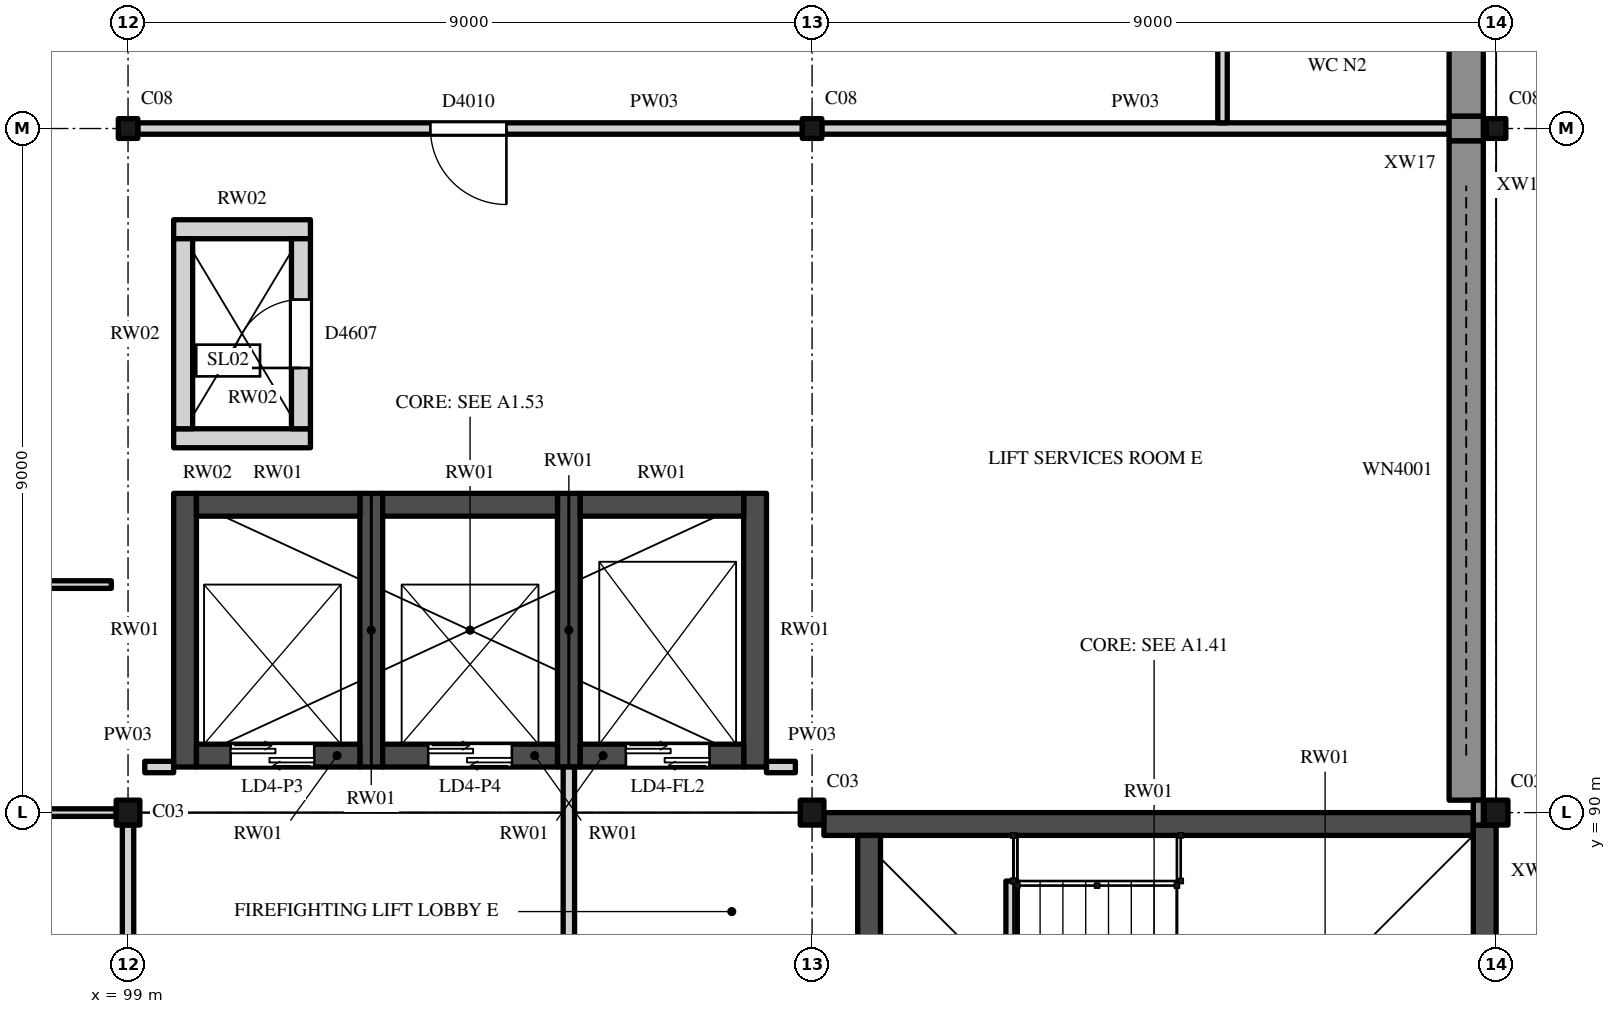
"""IFC4 building model, lengths in metres.
Left out: names, types, materials, properties, quantities, classifications, styles, units other than length and angle.
Written with IfcOpenShell. Run it as: python <this file> out.ifc"""

import sys

from ifc_helpers import new_model, si_unit, direction, frame, frame_2d, origin, origin_2d, place, context, subcontext, project, spatial, rectangle, i_section, extrude, element, fill, save


model = new_model("IFC4")
c1 = context("Model", 3, precision=1e-05, world=origin(), true_north=direction((0.0, 1.0)))
c2 = subcontext(c1, "Body", "Model", "MODEL_VIEW")
j1 = project(units=[si_unit("LENGTHUNIT", "METRE"), si_unit("PLANEANGLEUNIT", "RADIAN")], contexts=[c1])
p1 = place(None, origin())
s1 = spatial("IfcSite", under=j1, at=p1, CompositionType="ELEMENT")
p2 = place(p1, origin())
s2 = spatial("IfcBuilding", under=s1, at=p2, CompositionType="ELEMENT")
p3 = place(p2, frame((0.0, 0.0, 26.0)))
s3 = spatial("IfcBuildingStorey", under=s2, at=p3, CompositionType="ELEMENT", Elevation=26.0)
for number, where, z_axis, x_axis in (
    (1, (99.0, 90.0, 0.0), (0.0, 0.0, 1.0), (1.0, 0.0, 0.0)),
    (2, (108.0, 90.0, 0.0), (0.0, 0.0, 1.0), (1.0, 0.0, 0.0)),
    (3, (117.0, 90.0, 0.0), (0.0, 0.0, 1.0), (1.0, 0.0, 0.0)),
):
    element("IfcColumn", number, at=place(p3, frame(where, z_axis=z_axis, x_axis=x_axis)), inside=s3, PredefinedType="COLUMN", context=c2, shape_type="SweptSolid", body=[
        extrude(i_section(OverallWidth=0.311, OverallDepth=0.327, WebThickness=0.016, FlangeThickness=0.025, FilletRadius=0.017, at=origin_2d()), origin(), (0.0, 0.0, 1.0), 5.0),
    ])
for number, where, z_axis, x_axis in (
    (4, (99.0, 99.0, 0.0), (0.0, 0.0, 1.0), (1.0, 0.0, 0.0)),
    (5, (108.0, 99.0, 0.0), (0.0, 0.0, 1.0), (1.0, 0.0, 0.0)),
    (6, (117.0, 99.0, 0.0), (0.0, 0.0, 1.0), (1.0, 0.0, 0.0)),
):
    element("IfcColumn", number, at=place(p3, frame(where, z_axis=z_axis, x_axis=x_axis)), inside=s3, PredefinedType="COLUMN", context=c2, shape_type="SweptSolid", body=[
        extrude(i_section(OverallWidth=0.256, OverallDepth=0.26, WebThickness=0.01, FlangeThickness=0.017, FilletRadius=0.014, at=origin_2d()), origin(), (0.0, 0.0, 1.0), 5.0),
    ])
p4 = place(p3, frame((108.156, 89.85, 0.0), z_axis=(0.0, 0.0, 1.0), x_axis=(1.0, 0.0, 0.0)))
e7 = element("IfcWall", 7, at=p4, inside=s3, PredefinedType="SHEAR", context=c2, shape_type="SweptSolid", body=[
    extrude(rectangle(XDim=8.544, YDim=0.3, at=frame_2d((4.272, 0.0))), origin(), (0.0, 0.0, 1.0), 5.0),
])
p5 = place(p3, frame((108.75, 81.9, 0.0), z_axis=(0.0, 0.0, 1.0), x_axis=(0.0, 1.0, 0.0)))
e8 = element("IfcWall", 8, at=p5, inside=s3, PredefinedType="SHEAR", context=c2, shape_type="SweptSolid", body=[
    extrude(rectangle(XDim=7.8, YDim=0.3, at=frame_2d((3.9, 0.0))), origin(), (0.0, 0.0, 1.0), 5.0),
])
p6 = place(p5, frame((3.0, 0.0, 0.0)))
e9 = element("IfcOpeningElement", 9, at=p6, cuts=e8, PredefinedType="OPENING", context=c2, shape_type="SweptSolid", body=[
    extrude(rectangle(XDim=1.2, YDim=2.1, at=frame_2d((0.6, 1.05))), frame((0.0, 0.16, 0.0), z_axis=(0.0, -1.0, 0.0), x_axis=(1.0, 0.0, 0.0)), (0.0, 0.0, 1.0), 0.32),
])
p7 = place(p3, frame((116.85, 81.125, 0.0), z_axis=(0.0, 0.0, 1.0), x_axis=(0.0, 1.0, 0.0)))
e10 = element("IfcWall", 10, at=p7, inside=s3, PredefinedType="SHEAR", context=c2, shape_type="SweptSolid", body=[
    extrude(rectangle(XDim=8.711, YDim=0.3, at=frame_2d((4.356, 0.0))), origin(), (0.0, 0.0, 1.0), 5.0),
])
p8 = place(p3, frame((110.625, 85.5, 0.0), z_axis=(0.0, 0.0, 1.0), x_axis=(0.0, 1.0, 0.0)))
e11 = element("IfcWall", 11, at=p8, inside=s3, PredefinedType="STANDARD", context=c2, shape_type="SweptSolid", body=[
    extrude(rectangle(XDim=3.6, YDim=0.15, at=frame_2d((1.8, 0.0))), origin(), (0.0, 0.0, 1.0), 2.3),
])
for number, where, z_axis, x_axis in (
    (12, (99.75, 90.6, 0.0), (0.0, 0.0, 1.0), (0.0, 1.0, 0.0)),
    (13, (102.2, 90.6, 0.0), (0.0, 0.0, 1.0), (0.0, 1.0, 0.0)),
    (14, (104.8, 90.6, 0.0), (0.0, 0.0, 1.0), (0.0, 1.0, 0.0)),
    (15, (107.25, 90.6, 0.0), (0.0, 0.0, 1.0), (0.0, 1.0, 0.0)),
):
    element("IfcWall", number, at=place(p3, frame(where, z_axis=z_axis, x_axis=x_axis)), inside=s3, PredefinedType="SHEAR", context=c2, shape_type="SweptSolid", body=[
        extrude(rectangle(XDim=3.6, YDim=0.3, at=frame_2d((1.8, 0.0))), origin(), (0.0, 0.0, 1.0), 5.0),
    ])
p9 = place(p3, frame((99.9, 90.75, 0.0), z_axis=(0.0, 0.0, 1.0), x_axis=(1.0, 0.0, 0.0)))
e16 = element("IfcWall", 16, at=p9, inside=s3, PredefinedType="SHEAR", context=c2, shape_type="SweptSolid", body=[
    extrude(rectangle(XDim=2.15, YDim=0.3, at=frame_2d((1.075, 0.0))), origin(), (0.0, 0.0, 1.0), 5.0),
])
p10 = place(p9, frame((0.45, 0.0, 0.0)))
e17 = element("IfcOpeningElement", 17, at=p10, cuts=e16, PredefinedType="OPENING", context=c2, shape_type="SweptSolid", body=[
    extrude(rectangle(XDim=1.1, YDim=2.1, at=frame_2d((0.55, 1.05))), frame((0.0, 0.16, 0.0), z_axis=(0.0, -1.0, 0.0), x_axis=(1.0, 0.0, 0.0)), (0.0, 0.0, 1.0), 0.32),
])
p11 = place(p3, frame((99.9, 94.05, 0.0), z_axis=(0.0, 0.0, 1.0), x_axis=(1.0, 0.0, 0.0)))
e18 = element("IfcWall", 18, at=p11, inside=s3, PredefinedType="SHEAR", context=c2, shape_type="SweptSolid", body=[
    extrude(rectangle(XDim=2.15, YDim=0.3, at=frame_2d((1.075, 0.0))), origin(), (0.0, 0.0, 1.0), 5.0),
])
p12 = place(p3, frame((102.35, 90.75, 0.0), z_axis=(0.0, 0.0, 1.0), x_axis=(1.0, 0.0, 0.0)))
e19 = element("IfcWall", 19, at=p12, inside=s3, PredefinedType="SHEAR", context=c2, shape_type="SweptSolid", body=[
    extrude(rectangle(XDim=2.3, YDim=0.3, at=frame_2d((1.15, 0.0))), origin(), (0.0, 0.0, 1.0), 5.0),
])
p13 = place(p12, frame((0.6, 0.0, 0.0)))
e20 = element("IfcOpeningElement", 20, at=p13, cuts=e19, PredefinedType="OPENING", context=c2, shape_type="SweptSolid", body=[
    extrude(rectangle(XDim=1.1, YDim=2.1, at=frame_2d((0.55, 1.05))), frame((0.0, 0.16, 0.0), z_axis=(0.0, -1.0, 0.0), x_axis=(1.0, 0.0, 0.0)), (0.0, 0.0, 1.0), 0.32),
])
p14 = place(p3, frame((102.35, 94.05, 0.0), z_axis=(0.0, 0.0, 1.0), x_axis=(1.0, 0.0, 0.0)))
e21 = element("IfcWall", 21, at=p14, inside=s3, PredefinedType="SHEAR", context=c2, shape_type="SweptSolid", body=[
    extrude(rectangle(XDim=2.3, YDim=0.3, at=frame_2d((1.15, 0.0))), origin(), (0.0, 0.0, 1.0), 5.0),
])
p15 = place(p3, frame((104.95, 90.75, 0.0), z_axis=(0.0, 0.0, 1.0), x_axis=(1.0, 0.0, 0.0)))
e22 = element("IfcWall", 22, at=p15, inside=s3, PredefinedType="SHEAR", context=c2, shape_type="SweptSolid", body=[
    extrude(rectangle(XDim=2.15, YDim=0.3, at=frame_2d((1.075, 0.0))), origin(), (0.0, 0.0, 1.0), 5.0),
])
p16 = place(p15, frame((0.6, 0.0, 0.0)))
e23 = element("IfcOpeningElement", 23, at=p16, cuts=e22, PredefinedType="OPENING", context=c2, shape_type="SweptSolid", body=[
    extrude(rectangle(XDim=1.1, YDim=2.1, at=frame_2d((0.55, 1.05))), frame((0.0, 0.16, 0.0), z_axis=(0.0, -1.0, 0.0), x_axis=(1.0, 0.0, 0.0)), (0.0, 0.0, 1.0), 0.32),
])
p17 = place(p3, frame((104.95, 94.05, 0.0), z_axis=(0.0, 0.0, 1.0), x_axis=(1.0, 0.0, 0.0)))
e24 = element("IfcWall", 24, at=p17, inside=s3, PredefinedType="SHEAR", context=c2, shape_type="SweptSolid", body=[
    extrude(rectangle(XDim=2.15, YDim=0.3, at=frame_2d((1.075, 0.0))), origin(), (0.0, 0.0, 1.0), 5.0),
])
for number, where, z_axis, x_axis in (
    (25, (99.6, 94.925, 0.0), (0.0, 0.0, 1.0), (1.0, 0.0, 0.0)),
    (26, (99.6, 97.675, 0.0), (0.0, 0.0, 1.0), (1.0, 0.0, 0.0)),
):
    element("IfcWall", number, at=place(p3, frame(where, z_axis=z_axis, x_axis=x_axis)), inside=s3, PredefinedType="STANDARD", context=c2, shape_type="SweptSolid", body=[
        extrude(rectangle(XDim=1.8, YDim=0.25, at=frame_2d((0.9, 0.0))), origin(), (0.0, 0.0, 1.0), 5.0),
    ])
p18 = place(p3, frame((99.725, 95.05, 0.0), z_axis=(0.0, 0.0, 1.0), x_axis=(0.0, 1.0, 0.0)))
e27 = element("IfcWall", 27, at=p18, inside=s3, PredefinedType="STANDARD", context=c2, shape_type="SweptSolid", body=[
    extrude(rectangle(XDim=2.5, YDim=0.25, at=frame_2d((1.25, 0.0))), origin(), (0.0, 0.0, 1.0), 5.0),
])
p19 = place(p3, frame((101.275, 95.05, 0.0), z_axis=(0.0, 0.0, 1.0), x_axis=(0.0, 1.0, 0.0)))
e28 = element("IfcWall", 28, at=p19, inside=s3, PredefinedType="STANDARD", context=c2, shape_type="SweptSolid", body=[
    extrude(rectangle(XDim=2.5, YDim=0.25, at=frame_2d((1.25, 0.0))), origin(), (0.0, 0.0, 1.0), 5.0),
])
p20 = place(p19, frame((0.8, 0.0, 0.0)))
e29 = element("IfcOpeningElement", 29, at=p20, cuts=e28, PredefinedType="OPENING", context=c2, shape_type="SweptSolid", body=[
    extrude(rectangle(XDim=0.9, YDim=2.1, at=frame_2d((0.45, 1.05))), frame((0.0, 0.135, 0.0), z_axis=(0.0, -1.0, 0.0), x_axis=(1.0, 0.0, 0.0)), (0.0, 0.0, 1.0), 0.27),
])
p21 = place(p3, frame((116.606, 90.164, 0.0), z_axis=(0.0, 0.0, 1.0), x_axis=(0.0, 1.0, 0.0)))
e30 = element("IfcWall", 30, at=p21, inside=s3, PredefinedType="SOLIDWALL", context=c2, shape_type="SweptSolid", body=[
    extrude(rectangle(XDim=8.676, YDim=0.45, at=frame_2d((4.338, 0.0))), origin(), (0.0, 0.0, 1.0), 4.498),
])
p22 = place(p21, frame((0.586, 0.0, 1.6)))
e31 = element("IfcOpeningElement", 31, at=p22, cuts=e30, PredefinedType="OPENING", context=c2, shape_type="SweptSolid", body=[
    extrude(rectangle(XDim=7.5, YDim=1.2, at=frame_2d((3.75, 0.6))), frame((0.0, 0.235, 0.0), z_axis=(0.0, -1.0, 0.0), x_axis=(1.0, 0.0, 0.0)), (0.0, 0.0, 1.0), 0.47),
])
p23 = place(p3, frame((116.606, 99.161, 0.0), z_axis=(0.0, 0.0, 1.0), x_axis=(0.0, 1.0, 0.0)))
e32 = element("IfcWall", 32, at=p23, inside=s3, PredefinedType="SOLIDWALL", context=c2, shape_type="SweptSolid", body=[
    extrude(rectangle(XDim=8.678, YDim=0.45, at=frame_2d((4.339, 0.0))), origin(), (0.0, 0.0, 1.0), 4.498),
])
p24 = place(p3, frame((116.766, 89.836, 0.0), z_axis=(0.0, 0.0, 1.0), x_axis=(0.0, 1.0, 0.0)))
e33 = element("IfcWall", 33, at=p24, inside=s3, PredefinedType="SOLIDWALL", context=c2, shape_type="SweptSolid", body=[
    extrude(rectangle(XDim=0.327, YDim=0.131, at=frame_2d((0.164, 0.0))), origin(), (0.0, 0.0, 1.0), 5.0),
])
p25 = place(p3, frame((116.606, 98.839, 0.0), z_axis=(0.0, 0.0, 1.0), x_axis=(0.0, 1.0, 0.0)))
e34 = element("IfcWall", 34, at=p25, inside=s3, PredefinedType="SOLIDWALL", context=c2, shape_type="SweptSolid", body=[
    extrude(rectangle(XDim=0.322, YDim=0.45, at=frame_2d((0.161, 0.0))), origin(), (0.0, 0.0, 1.0), 4.498),
])
p26 = place(p3, frame((90.156, 90.0, 0.0), z_axis=(0.0, 0.0, 1.0), x_axis=(1.0, 0.0, 0.0)))
e35 = element("IfcWall", 35, at=p26, inside=s3, PredefinedType="PARTITIONING", context=c2, shape_type="SweptSolid", body=[
    extrude(rectangle(XDim=8.689, YDim=0.1, at=frame_2d((4.344, 0.0))), origin(), (0.0, 0.0, 1.0), 4.518),
])
for number, where, z_axis, x_axis in (
    (36, (99.22, 90.6, 0.0), (0.0, 0.0, 1.0), (1.0, 0.0, 0.0)),
    (37, (107.4, 90.6, 0.0), (0.0, 0.0, 1.0), (1.0, 0.0, 0.0)),
):
    element("IfcWall", number, at=place(p3, frame(where, z_axis=z_axis, x_axis=x_axis)), inside=s3, PredefinedType="PARTITIONING", context=c2, shape_type="SweptSolid", body=[
        extrude(rectangle(XDim=0.38, YDim=0.15, at=frame_2d((0.19, 0.0))), origin(), (0.0, 0.0, 1.0), 4.825),
    ])
p27 = place(p3, frame((90.22, 93.0, 0.0), z_axis=(0.0, 0.0, 1.0), x_axis=(1.0, 0.0, 0.0)))
e38 = element("IfcWall", 38, at=p27, inside=s3, PredefinedType="PARTITIONING", context=c2, shape_type="SweptSolid", body=[
    extrude(rectangle(XDim=8.56, YDim=0.1, at=frame_2d((4.28, 0.0))), origin(), (0.0, 0.0, 1.0), 4.521),
])
p28 = place(p3, frame((99.128, 99.0, 0.0), z_axis=(0.0, 0.0, 1.0), x_axis=(1.0, 0.0, 0.0)))
e39 = element("IfcWall", 39, at=p28, inside=s3, PredefinedType="PARTITIONING", context=c2, shape_type="SweptSolid", body=[
    extrude(rectangle(XDim=8.744, YDim=0.15, at=frame_2d((4.372, 0.0))), origin(), (0.0, 0.0, 1.0), 4.518),
])
p29 = place(p28, frame((3.85, 0.0, 0.0)))
e40 = element("IfcOpeningElement", 40, at=p29, cuts=e39, PredefinedType="OPENING", context=c2, shape_type="SweptSolid", body=[
    extrude(rectangle(XDim=1.0, YDim=2.4, at=frame_2d((0.5, 1.2))), frame((0.0, 0.085, 0.0), z_axis=(0.0, -1.0, 0.0), x_axis=(1.0, 0.0, 0.0)), (0.0, 0.0, 1.0), 0.17),
])
p30 = place(p3, frame((108.128, 99.0, 0.0), z_axis=(0.0, 0.0, 1.0), x_axis=(1.0, 0.0, 0.0)))
e41 = element("IfcWall", 41, at=p30, inside=s3, PredefinedType="PARTITIONING", context=c2, shape_type="SweptSolid", body=[
    extrude(rectangle(XDim=8.253, YDim=0.15, at=frame_2d((4.127, 0.0))), origin(), (0.0, 0.0, 1.0), 4.518),
])
p31 = place(p3, frame((99.0, 84.075, 0.0), z_axis=(0.0, 0.0, 1.0), x_axis=(0.0, 1.0, 0.0)))
e42 = element("IfcWall", 42, at=p31, inside=s3, PredefinedType="PARTITIONING", context=c2, shape_type="SweptSolid", body=[
    extrude(rectangle(XDim=5.761, YDim=0.15, at=frame_2d((2.881, 0.0))), origin(), (0.0, 0.0, 1.0), 4.419),
])
p32 = place(p3, frame((104.8, 84.075, 0.0), z_axis=(0.0, 0.0, 1.0), x_axis=(0.0, 1.0, 0.0)))
e43 = element("IfcWall", 43, at=p32, inside=s3, PredefinedType="PARTITIONING", context=c2, shape_type="SweptSolid", body=[
    extrude(rectangle(XDim=6.525, YDim=0.15, at=frame_2d((3.263, 0.0))), origin(), (0.0, 0.0, 1.0), 4.825),
])
p33 = place(p32, frame((2.85, 0.0, 0.0)))
e44 = element("IfcOpeningElement", 44, at=p33, cuts=e43, PredefinedType="OPENING", context=c2, shape_type="SweptSolid", body=[
    extrude(rectangle(XDim=0.9, YDim=2.1, at=frame_2d((0.45, 1.05))), frame((0.0, 0.085, 0.0), z_axis=(0.0, -1.0, 0.0), x_axis=(1.0, 0.0, 0.0)), (0.0, 0.0, 1.0), 0.17),
])
p34 = place(p3, frame((113.4, 99.075, 0.0), z_axis=(0.0, 0.0, 1.0), x_axis=(0.0, 1.0, 0.0)))
e45 = element("IfcWall", 45, at=p34, inside=s3, PredefinedType="PARTITIONING", context=c2, shape_type="SweptSolid", body=[
    extrude(rectangle(XDim=2.863, YDim=0.125, at=frame_2d((1.431, 0.0))), origin(), (0.0, 0.0, 1.0), 4.825),
])
p35 = place(p10, origin())
e46 = element("IfcDoor", 46, at=p35, inside=s3, OperationType="DOUBLE_DOOR_SLIDING", PredefinedType="DOOR", context=c2, shape_type="SweptSolid", body=[
    extrude(rectangle(XDim=1.1, YDim=2.1, at=frame_2d((0.55, 1.05))), frame((0.0, 0.025, 0.0), z_axis=(0.0, -1.0, 0.0), x_axis=(1.0, 0.0, 0.0)), (0.0, 0.0, 1.0), 0.05),
])
fill(e17, e46)
p36 = place(p13, origin())
e47 = element("IfcDoor", 47, at=p36, inside=s3, OperationType="DOUBLE_DOOR_SLIDING", PredefinedType="DOOR", context=c2, shape_type="SweptSolid", body=[
    extrude(rectangle(XDim=1.1, YDim=2.1, at=frame_2d((0.55, 1.05))), frame((0.0, 0.025, 0.0), z_axis=(0.0, -1.0, 0.0), x_axis=(1.0, 0.0, 0.0)), (0.0, 0.0, 1.0), 0.05),
])
fill(e20, e47)
p37 = place(p16, origin())
e48 = element("IfcDoor", 48, at=p37, inside=s3, OperationType="DOUBLE_DOOR_SLIDING", PredefinedType="DOOR", context=c2, shape_type="SweptSolid", body=[
    extrude(rectangle(XDim=1.1, YDim=2.1, at=frame_2d((0.55, 1.05))), frame((0.0, 0.025, 0.0), z_axis=(0.0, -1.0, 0.0), x_axis=(1.0, 0.0, 0.0)), (0.0, 0.0, 1.0), 0.05),
])
fill(e23, e48)
p38 = place(p20, origin())
e49 = element("IfcDoor", 49, at=p38, inside=s3, OperationType="SINGLE_SWING_RIGHT", PredefinedType="DOOR", context=c2, shape_type="SweptSolid", body=[
    extrude(rectangle(XDim=0.9, YDim=2.1, at=frame_2d((0.45, 1.05))), frame((0.0, 0.025, 0.0), z_axis=(0.0, -1.0, 0.0), x_axis=(1.0, 0.0, 0.0)), (0.0, 0.0, 1.0), 0.05),
])
fill(e29, e49)
p39 = place(p22, origin())
e50 = element("IfcWindow", 50, at=p39, inside=s3, PartitioningType="SINGLE_PANEL", PredefinedType="WINDOW", context=c2, shape_type="SweptSolid", body=[
    extrude(rectangle(XDim=7.5, YDim=1.2, at=frame_2d((3.75, 0.6))), frame((0.0, 0.03, 0.0), z_axis=(0.0, -1.0, 0.0), x_axis=(1.0, 0.0, 0.0)), (0.0, 0.0, 1.0), 0.06),
])
fill(e31, e50)
p40 = place(p29, origin())
e51 = element("IfcDoor", 51, at=p40, inside=s3, OperationType="SINGLE_SWING_RIGHT", PredefinedType="DOOR", context=c2, shape_type="SweptSolid", body=[
    extrude(rectangle(XDim=1.0, YDim=2.4, at=frame_2d((0.5, 1.2))), frame((0.0, 0.025, 0.0), z_axis=(0.0, -1.0, 0.0), x_axis=(1.0, 0.0, 0.0)), (0.0, 0.0, 1.0), 0.05),
])
fill(e40, e51)
save(model, sys.argv[1])
